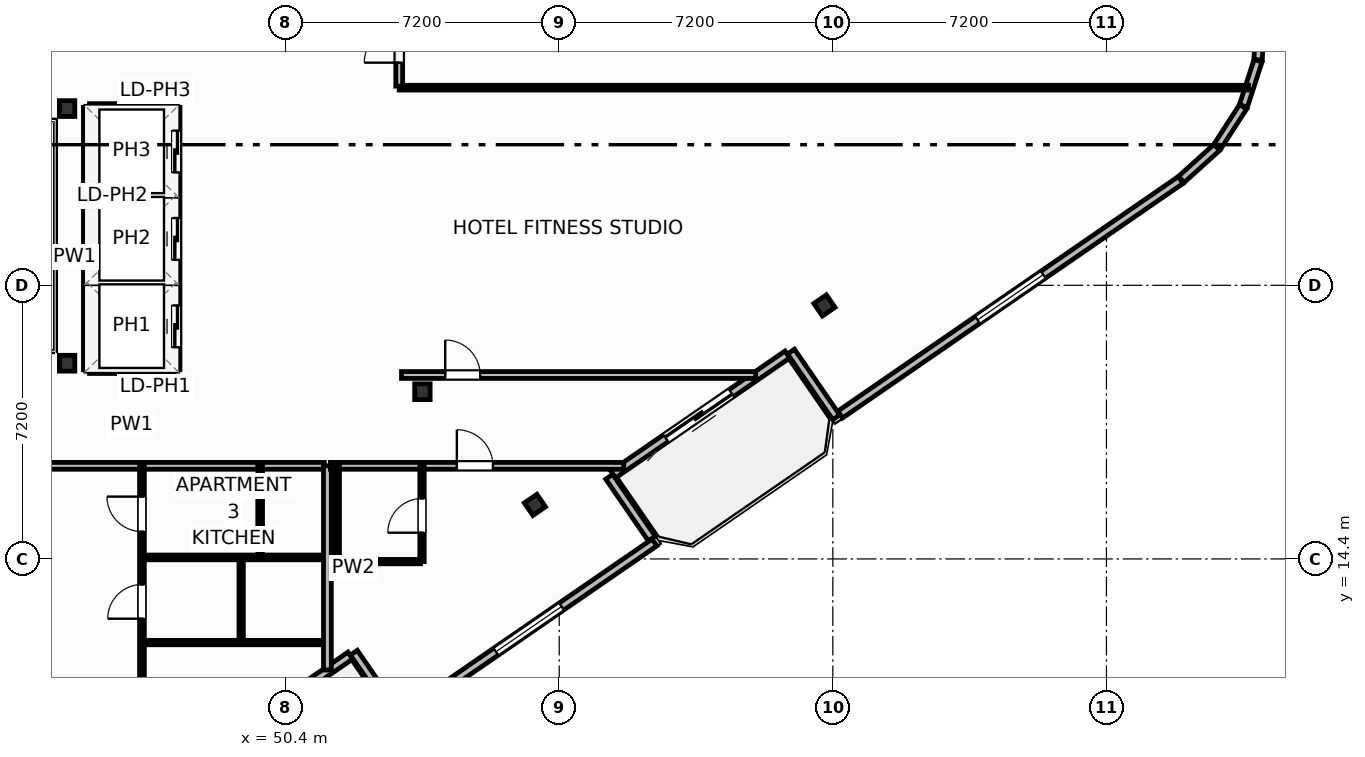
"""IFC4 building model, lengths in metres.
Left out: names, types, materials, properties, quantities, classifications, styles, units other than length and angle.
Written with IfcOpenShell. Run it as: python <this file> out.ifc"""

import sys

from ifc_helpers import new_model, si_unit, direction, frame, frame_2d, origin, origin_2d, place, context, subcontext, project, spatial, rectangle, i_section, extrude, element, fill, save


model = new_model("IFC4")
c1 = context("Model", 3, precision=1e-05, world=origin(), true_north=direction((0.0, 1.0)))
c2 = subcontext(c1, "Body", "Model", "MODEL_VIEW")
j1 = project(units=[si_unit("LENGTHUNIT", "METRE"), si_unit("PLANEANGLEUNIT", "RADIAN")], contexts=[c1])
p1 = place(None, origin())
s1 = spatial("IfcSite", under=j1, at=p1, CompositionType="ELEMENT")
p2 = place(p1, origin())
s2 = spatial("IfcBuilding", under=s1, at=p2, CompositionType="ELEMENT")
p3 = place(p2, frame((0.0, 0.0, 276.7)))
s3 = spatial("IfcBuildingStorey", under=s2, at=p3, CompositionType="ELEMENT", Elevation=276.7)
for number, where, z_axis, x_axis in (
    (1, (44.65, 19.55, 0.0), (0.0, 0.0, 1.0), (1.0, 0.0, 0.0)),
    (2, (44.65, 26.25, 0.0), (0.0, 0.0, 1.0), (1.0, 0.0, 0.0)),
    (3, (54.0, 18.8, 0.0), (0.0, 0.0, 1.0), (1.0, 0.0, 0.0)),
):
    element("IfcColumn", number, at=place(p3, frame(where, z_axis=z_axis, x_axis=x_axis)), inside=s3, PredefinedType="COLUMN", context=c2, shape_type="SweptSolid", body=[
        extrude(i_section(OverallWidth=0.406, OverallDepth=0.416, WebThickness=0.03, FlangeThickness=0.048, FilletRadius=0.025, at=origin_2d()), origin(), (0.0, 0.0, 1.0), 3.7),
    ])
for number, where, z_axis, x_axis in (
    (4, (56.96, 15.823, 0.0), (0.0, 0.0, 1.0), (0.824, 0.567, 0.0)),
    (5, (64.578, 21.07, 0.0), (0.0, 0.0, 1.0), (0.824, 0.567, 0.0)),
):
    element("IfcColumn", number, at=place(p3, frame(where, z_axis=z_axis, x_axis=x_axis)), inside=s3, PredefinedType="COLUMN", context=c2, shape_type="SweptSolid", body=[
        extrude(i_section(OverallWidth=0.401, OverallDepth=0.399, WebThickness=0.025, FlangeThickness=0.04, FilletRadius=0.022, at=origin_2d()), origin(), (0.0, 0.0, 1.0), 3.7),
    ])
p4 = place(p3, frame((52.103, 11.857, 0.0), z_axis=(0.0, 0.0, 1.0), x_axis=(-0.823534636215, -0.567265989598, 0.0)))
e6 = element("IfcWall", 6, at=p4, inside=s3, PredefinedType="SOLIDWALL", context=c2, shape_type="SweptSolid", body=[
    extrude(rectangle(XDim=6.0, YDim=0.22, at=frame_2d((3.0, 0.0))), origin(), (0.0, 0.0, 1.0), 2.73),
])
p5 = place(p4, frame((3.5, 0.0, 0.0)))
e7 = element("IfcOpeningElement", 7, at=p5, cuts=e6, PredefinedType="OPENING", context=c2, shape_type="SweptSolid", body=[
    extrude(rectangle(XDim=2.1, YDim=2.3, at=frame_2d((1.05, 1.15))), frame((0.0, 0.12, 0.0), z_axis=(0.0, -1.0, 0.0), x_axis=(1.0, 0.0, 0.0)), (0.0, 0.0, 1.0), 0.24),
])
p6 = place(p3, frame((63.605, 19.78, 0.0), z_axis=(0.0, 0.0, 1.0), x_axis=(-0.823541290762, -0.567256328665, 0.0)))
e8 = element("IfcWall", 8, at=p6, inside=s3, PredefinedType="SOLIDWALL", context=c2, shape_type="SweptSolid", body=[
    extrude(rectangle(XDim=5.567, YDim=0.22, at=frame_2d((2.784, 0.0))), origin(), (0.0, 0.0, 1.0), 2.73),
])
p7 = place(p6, frame((1.787, 0.0, 0.0)))
e9 = element("IfcOpeningElement", 9, at=p7, cuts=e8, PredefinedType="OPENING", context=c2, shape_type="SweptSolid", body=[
    extrude(rectangle(XDim=2.1, YDim=2.3, at=frame_2d((1.05, 1.15))), frame((0.0, 0.12, 0.0), z_axis=(0.0, -1.0, 0.0), x_axis=(1.0, 0.0, 0.0)), (0.0, 0.0, 1.0), 0.24),
])
p8 = place(p3, frame((52.196, 11.933, 0.0), z_axis=(0.0, 0.0, 1.0), x_axis=(0.56729822855, -0.823512428494, 0.0)))
e10 = element("IfcWall", 10, at=p8, inside=s3, PredefinedType="SOLIDWALL", context=c2, shape_type="SweptSolid", body=[
    extrude(rectangle(XDim=2.1, YDim=0.22, at=frame_2d((1.05, 0.0))), origin(), (0.0, 0.0, 1.0), 2.73),
])
p9 = place(p3, frame((53.49, 10.275, 0.0), z_axis=(0.0, 0.0, 1.0), x_axis=(0.823530942962, 0.56727135128, 0.0)))
e11 = element("IfcWall", 11, at=p9, inside=s3, PredefinedType="SOLIDWALL", context=c2, shape_type="SweptSolid", body=[
    extrude(rectangle(XDim=8.035, YDim=0.22, at=frame_2d((4.018, 0.0))), origin(), (0.0, 0.0, 1.0), 2.73),
])
p10 = place(p9, frame((2.968, 0.0, 0.8)))
e12 = element("IfcOpeningElement", 12, at=p10, cuts=e11, PredefinedType="OPENING", context=c2, shape_type="SweptSolid", body=[
    extrude(rectangle(XDim=2.1, YDim=1.75, at=frame_2d((1.05, 0.875))), frame((0.0, 0.12, 0.0), z_axis=(0.0, -1.0, 0.0), x_axis=(1.0, 0.0, 0.0)), (0.0, 0.0, 1.0), 0.24),
])
p11 = place(p3, frame((60.036, 14.936, 0.0), z_axis=(0.0, 0.0, 1.0), x_axis=(-0.567273565974, 0.823529417415, 0.0)))
e13 = element("IfcWall", 13, at=p11, inside=s3, PredefinedType="SOLIDWALL", context=c2, shape_type="SweptSolid", body=[
    extrude(rectangle(XDim=1.975, YDim=0.22, at=frame_2d((0.988, 0.0))), origin(), (0.0, 0.0, 1.0), 2.73),
])
p12 = place(p3, frame((63.698, 19.856, 0.0), z_axis=(0.0, 0.0, 1.0), x_axis=(0.567219383419, -0.823566737474, 0.0)))
e14 = element("IfcWall", 14, at=p12, inside=s3, PredefinedType="SOLIDWALL", context=c2, shape_type="SweptSolid", body=[
    extrude(rectangle(XDim=2.1, YDim=0.22, at=frame_2d((1.05, 0.0))), origin(), (0.0, 0.0, 1.0), 2.73),
])
p13 = place(p3, frame((64.992, 18.198, 0.0), z_axis=(0.0, 0.0, 1.0), x_axis=(0.823538117322, 0.56726093583, 0.0)))
e15 = element("IfcWall", 15, at=p13, inside=s3, PredefinedType="SOLIDWALL", context=c2, shape_type="SweptSolid", body=[
    extrude(rectangle(XDim=10.88, YDim=0.22, at=frame_2d((5.44, 0.0))), origin(), (0.0, 0.0, 1.0), 2.73),
])
p14 = place(p13, frame((4.39, 0.0, 0.8)))
e16 = element("IfcOpeningElement", 16, at=p14, cuts=e15, PredefinedType="OPENING", context=c2, shape_type="SweptSolid", body=[
    extrude(rectangle(XDim=2.1, YDim=1.75, at=frame_2d((1.05, 0.875))), frame((0.0, 0.12, 0.0), z_axis=(0.0, -1.0, 0.0), x_axis=(1.0, 0.0, 0.0)), (0.0, 0.0, 1.0), 0.24),
])
p15 = place(p3, frame((73.971, 24.387, 0.0), z_axis=(0.0, 0.0, 1.0), x_axis=(0.742501517089, 0.669844382764, 0.0)))
e17 = element("IfcWall", 17, at=p15, inside=s3, PredefinedType="SOLIDWALL", context=c2, shape_type="SweptSolid", body=[
    extrude(rectangle(XDim=1.257, YDim=0.22, at=frame_2d((0.628, 0.0))), origin(), (0.0, 0.0, 1.0), 2.73),
])
p16 = place(p3, frame((74.917, 25.25, 0.0), z_axis=(0.0, 0.0, 1.0), x_axis=(0.543778157277, 0.839229000731, 0.0)))
e18 = element("IfcWall", 18, at=p16, inside=s3, PredefinedType="SOLIDWALL", context=c2, shape_type="SweptSolid", body=[
    extrude(rectangle(XDim=1.249, YDim=0.22, at=frame_2d((0.624, 0.0))), origin(), (0.0, 0.0, 1.0), 2.73),
])
for number, where, z_axis, x_axis in (
    (19, (75.604, 26.321, 0.0), (0.0, 0.0, 1.0), (0.308, 0.951, 0.0)),
    (20, (75.99, 27.534, 0.0), (0.0, 0.0, 1.0), (0.051, 0.999, 0.0)),
):
    element("IfcWall", number, at=place(p3, frame(where, z_axis=z_axis, x_axis=x_axis)), inside=s3, PredefinedType="SOLIDWALL", context=c2, shape_type="SweptSolid", body=[
        extrude(rectangle(XDim=1.249, YDim=0.22, at=frame_2d((0.625, 0.0))), origin(), (0.0, 0.0, 1.0), 2.73),
    ])
p17 = place(p3, frame((39.28, 16.85, 0.0), z_axis=(0.0, 0.0, 1.0), x_axis=(1.0, 0.0, 0.0)))
e21 = element("IfcWall", 21, at=p17, inside=s3, PredefinedType="PARTITIONING", context=c2, shape_type="SweptSolid", body=[
    extrude(rectangle(XDim=12.14, YDim=0.18, at=frame_2d((6.07, 0.0))), origin(), (0.0, 0.0, 1.0), 3.45),
])
p18 = place(p17, frame((3.135, 0.0, 0.0)))
e22 = element("IfcOpeningElement", 22, at=p18, cuts=e21, PredefinedType="OPENING", context=c2, shape_type="SweptSolid", body=[
    extrude(rectangle(XDim=1.0, YDim=2.2, at=frame_2d((0.5, 1.1))), frame((0.0, 0.1, 0.0), z_axis=(0.0, -1.0, 0.0), x_axis=(1.0, 0.0, 0.0)), (0.0, 0.0, 1.0), 0.2),
])
p19 = place(p3, frame((46.62, 5.567, 0.0), z_axis=(0.0, 0.0, 1.0), x_axis=(0.0, 1.0, 0.0)))
e23 = element("IfcWall", 23, at=p19, inside=s3, PredefinedType="PARTITIONING", context=c2, shape_type="SweptSolid", body=[
    extrude(rectangle(XDim=11.283, YDim=0.125, at=frame_2d((5.642, 0.0))), origin(), (0.0, 0.0, 1.0), 3.45),
])
p20 = place(p19, frame((4.757, 0.0, 0.0)))
e24 = element("IfcOpeningElement", 24, at=p20, cuts=e23, PredefinedType="OPENING", context=c2, shape_type="SweptSolid", body=[
    extrude(rectangle(XDim=0.92, YDim=2.05, at=frame_2d((0.46, 1.025))), frame((0.0, 0.073, 0.0), z_axis=(0.0, -1.0, 0.0), x_axis=(1.0, 0.0, 0.0)), (0.0, 0.0, 1.0), 0.145),
])
p21 = place(p19, frame((7.26, 0.0, 0.0)))
e25 = element("IfcOpeningElement", 25, at=p21, cuts=e23, PredefinedType="OPENING", context=c2, shape_type="SweptSolid", body=[
    extrude(rectangle(XDim=0.9, YDim=2.05, at=frame_2d((0.45, 1.025))), frame((0.0, 0.073, 0.0), z_axis=(0.0, -1.0, 0.0), x_axis=(1.0, 0.0, 0.0)), (0.0, 0.0, 1.0), 0.145),
])
p22 = place(p19, frame((9.553, 0.0, 0.0)))
e26 = element("IfcOpeningElement", 26, at=p22, cuts=e23, PredefinedType="OPENING", context=c2, shape_type="SweptSolid", body=[
    extrude(rectangle(XDim=0.92, YDim=2.05, at=frame_2d((0.46, 1.025))), frame((0.0, 0.073, 0.0), z_axis=(0.0, -1.0, 0.0), x_axis=(1.0, 0.0, 0.0)), (0.0, 0.0, 1.0), 0.145),
])
p23 = place(p3, frame((46.69, 14.44, 0.0), z_axis=(0.0, 0.0, 1.0), x_axis=(1.0, 0.0, 0.0)))
e27 = element("IfcWall", 27, at=p23, inside=s3, PredefinedType="PARTITIONING", context=c2, shape_type="SweptSolid", body=[
    extrude(rectangle(XDim=4.73, YDim=0.125, at=frame_2d((2.365, 0.0))), origin(), (0.0, 0.0, 1.0), 3.45),
])
p24 = place(p3, frame((46.69, 12.2, 0.0), z_axis=(0.0, 0.0, 1.0), x_axis=(1.0, 0.0, 0.0)))
e28 = element("IfcWall", 28, at=p24, inside=s3, PredefinedType="PARTITIONING", context=c2, shape_type="SweptSolid", body=[
    extrude(rectangle(XDim=4.73, YDim=0.115, at=frame_2d((2.365, 0.0))), origin(), (0.0, 0.0, 1.0), 3.45),
])
p25 = place(p3, frame((49.73, 14.44, 0.0), z_axis=(0.0, 0.0, 1.0), x_axis=(0.0, 1.0, 0.0)))
e29 = element("IfcWall", 29, at=p25, inside=s3, PredefinedType="PARTITIONING", context=c2, shape_type="SweptSolid", body=[
    extrude(rectangle(XDim=2.41, YDim=0.125, at=frame_2d((1.205, 0.0))), origin(), (0.0, 0.0, 1.0), 3.45),
])
p26 = place(p3, frame((49.23, 12.2, 0.0), z_axis=(0.0, 0.0, 1.0), x_axis=(0.0, 1.0, 0.0)))
e30 = element("IfcWall", 30, at=p26, inside=s3, PredefinedType="PARTITIONING", context=c2, shape_type="SweptSolid", body=[
    extrude(rectangle(XDim=2.24, YDim=0.115, at=frame_2d((1.12, 0.0))), origin(), (0.0, 0.0, 1.0), 3.45),
])
p27 = place(p3, frame((51.5, 11.479, 0.0), z_axis=(0.0, 0.0, 1.0), x_axis=(0.0, 1.0, 0.0)))
e31 = element("IfcWall", 31, at=p27, inside=s3, PredefinedType="PARTITIONING", context=c2, shape_type="SweptSolid", body=[
    extrude(rectangle(XDim=5.372, YDim=0.205, at=frame_2d((2.686, 0.0))), origin(), (0.0, 0.0, 1.0), 3.45),
])
p28 = place(p3, frame((51.58, 16.85, 0.0), z_axis=(0.0, 0.0, 1.0), x_axis=(1.0, 0.0, 0.0)))
e32 = element("IfcWall", 32, at=p28, inside=s3, PredefinedType="PARTITIONING", context=c2, shape_type="SweptSolid", body=[
    extrude(rectangle(XDim=7.718, YDim=0.18, at=frame_2d((3.859, 0.0))), origin(), (0.0, 0.0, 1.0), 3.45),
])
p29 = place(p28, frame((3.326, 0.0, 0.0)))
e33 = element("IfcOpeningElement", 33, at=p29, cuts=e32, PredefinedType="OPENING", context=c2, shape_type="SweptSolid", body=[
    extrude(rectangle(XDim=0.95, YDim=2.15, at=frame_2d((0.475, 1.075))), frame((0.0, 0.1, 0.0), z_axis=(0.0, -1.0, 0.0), x_axis=(1.0, 0.0, 0.0)), (0.0, 0.0, 1.0), 0.2),
])
p30 = place(p3, frame((51.8, 14.33, 0.0), z_axis=(0.0, 0.0, 1.0), x_axis=(1.0, 0.0, 0.0)))
e34 = element("IfcWall", 34, at=p30, inside=s3, PredefinedType="PARTITIONING", context=c2, shape_type="SweptSolid", body=[
    extrude(rectangle(XDim=2.15, YDim=0.115, at=frame_2d((1.075, 0.0))), origin(), (0.0, 0.0, 1.0), 3.45),
])
p31 = place(p3, frame((53.99, 14.33, 0.0), z_axis=(0.0, 0.0, 1.0), x_axis=(0.0, 1.0, 0.0)))
e35 = element("IfcWall", 35, at=p31, inside=s3, PredefinedType="PARTITIONING", context=c2, shape_type="SweptSolid", body=[
    extrude(rectangle(XDim=2.52, YDim=0.115, at=frame_2d((1.26, 0.0))), origin(), (0.0, 0.0, 1.0), 3.45),
])
p32 = place(p31, frame((0.76, 0.0, 0.0)))
e36 = element("IfcOpeningElement", 36, at=p32, cuts=e35, PredefinedType="OPENING", context=c2, shape_type="SweptSolid", body=[
    extrude(rectangle(XDim=0.9, YDim=2.05, at=frame_2d((0.45, 1.025))), frame((0.0, 0.067, 0.0), z_axis=(0.0, -1.0, 0.0), x_axis=(1.0, 0.0, 0.0)), (0.0, 0.0, 1.0), 0.135),
])
p33 = place(p3, frame((51.76, 14.33, 0.0), z_axis=(0.0, 0.0, 1.0), x_axis=(0.0, 1.0, 0.0)))
e37 = element("IfcWall", 37, at=p33, inside=s3, PredefinedType="PARTITIONING", context=c2, shape_type="SweptSolid", body=[
    extrude(rectangle(XDim=2.52, YDim=0.115, at=frame_2d((1.26, 0.0))), origin(), (0.0, 0.0, 1.0), 3.45),
])
p34 = place(p3, frame((53.45, 19.24, 0.0), z_axis=(0.0, 0.0, 1.0), x_axis=(1.0, 0.0, 0.0)))
e38 = element("IfcWall", 38, at=p34, inside=s3, PredefinedType="PARTITIONING", context=c2, shape_type="SweptSolid", body=[
    extrude(rectangle(XDim=9.318, YDim=0.18, at=frame_2d((4.659, 0.0))), origin(), (0.0, 0.0, 1.0), 2.739),
])
p35 = place(p34, frame((1.15, 0.0, 0.0)))
e39 = element("IfcOpeningElement", 39, at=p35, cuts=e38, PredefinedType="OPENING", context=c2, shape_type="SweptSolid", body=[
    extrude(rectangle(XDim=0.92, YDim=2.05, at=frame_2d((0.46, 1.025))), frame((0.0, 0.1, 0.0), z_axis=(0.0, -1.0, 0.0), x_axis=(1.0, 0.0, 0.0)), (0.0, 0.0, 1.0), 0.2),
])
p36 = place(p3, frame((53.39, 26.8, 0.0), z_axis=(0.0, 0.0, 1.0), x_axis=(1.0, 0.0, 0.0)))
e40 = element("IfcWall", 40, at=p36, inside=s3, PredefinedType="PARTITIONING", context=c2, shape_type="SweptSolid", body=[
    extrude(rectangle(XDim=22.348, YDim=0.125, at=frame_2d((11.174, 0.0))), origin(), (0.0, 0.0, 1.0), 3.45),
])
p37 = place(p3, frame((53.39, 26.84, 0.0), z_axis=(0.0, 0.0, 1.0), x_axis=(0.0, 1.0, 0.0)))
e41 = element("IfcWall", 41, at=p37, inside=s3, PredefinedType="PARTITIONING", context=c2, shape_type="SweptSolid", body=[
    extrude(rectangle(XDim=12.46, YDim=0.18, at=frame_2d((6.23, 0.0))), origin(), (0.0, 0.0, 1.0), 3.45),
])
p38 = place(p37, frame((0.618, 0.0, 0.0)))
e42 = element("IfcOpeningElement", 42, at=p38, cuts=e41, PredefinedType="OPENING", context=c2, shape_type="SweptSolid", body=[
    extrude(rectangle(XDim=0.92, YDim=2.05, at=frame_2d((0.46, 1.025))), frame((0.0, 0.1, 0.0), z_axis=(0.0, -1.0, 0.0), x_axis=(1.0, 0.0, 0.0)), (0.0, 0.0, 1.0), 0.2),
])
for number, where, z_axis, x_axis in (
    (43, (45.24, 21.675, 0.0), (0.0, 0.0, 1.0), (1.0, 0.0, 0.0)),
    (44, (45.24, 23.975, 0.0), (0.0, 0.0, 1.0), (1.0, 0.0, 0.0)),
):
    element("IfcWall", number, at=place(p3, frame(where, z_axis=z_axis, x_axis=x_axis)), inside=s3, PredefinedType="PARTITIONING", context=c2, shape_type="SweptSolid", body=[
        extrude(rectangle(XDim=2.22, YDim=0.2, at=frame_2d((1.11, 0.0))), origin(), (0.0, 0.0, 1.0), 3.45),
    ])
p39 = place(p3, frame((45.24, 19.38, 0.0), z_axis=(0.0, 0.0, 1.0), x_axis=(1.0, 0.0, 0.0)))
e45 = element("IfcWall", 45, at=p39, inside=s3, PredefinedType="PARTITIONING", context=c2, shape_type="SweptSolid", body=[
    extrude(rectangle(XDim=2.22, YDim=0.2, at=frame_2d((1.11, 0.0))), origin(), (0.0, 0.0, 1.0), 2.662),
])
p40 = place(p3, frame((45.24, 26.28, 0.0), z_axis=(0.0, 0.0, 1.0), x_axis=(1.0, 0.0, 0.0)))
e46 = element("IfcWall", 46, at=p40, inside=s3, PredefinedType="PARTITIONING", context=c2, shape_type="SweptSolid", body=[
    extrude(rectangle(XDim=2.22, YDim=0.2, at=frame_2d((1.11, 0.0))), origin(), (0.0, 0.0, 1.0), 3.45),
])
p41 = place(p3, frame((45.18, 19.38, 0.0), z_axis=(0.0, 0.0, 1.0), x_axis=(0.0, 1.0, 0.0)))
e47 = element("IfcWall", 47, at=p41, inside=s3, PredefinedType="PARTITIONING", context=c2, shape_type="SweptSolid", body=[
    extrude(rectangle(XDim=6.9, YDim=0.2, at=frame_2d((3.45, 0.0))), origin(), (0.0, 0.0, 1.0), 3.45),
])
p42 = place(p3, frame((47.52, 19.38, 0.0), z_axis=(0.0, 0.0, 1.0), x_axis=(0.0, 1.0, 0.0)))
e48 = element("IfcWall", 48, at=p42, inside=s3, PredefinedType="PARTITIONING", context=c2, shape_type="SweptSolid", body=[
    extrude(rectangle(XDim=6.9, YDim=0.2, at=frame_2d((3.45, 0.0))), origin(), (0.0, 0.0, 1.0), 3.45),
])
p43 = place(p42, frame((0.59, 0.0, 0.0)))
e49 = element("IfcOpeningElement", 49, at=p43, cuts=e48, PredefinedType="OPENING", context=c2, shape_type="SweptSolid", body=[
    extrude(rectangle(XDim=1.1, YDim=2.15, at=frame_2d((0.55, 1.075))), frame((0.0, 0.11, 0.0), z_axis=(0.0, -1.0, 0.0), x_axis=(1.0, 0.0, 0.0)), (0.0, 0.0, 1.0), 0.22),
])
p44 = place(p42, frame((2.89, 0.0, 0.0)))
e50 = element("IfcOpeningElement", 50, at=p44, cuts=e48, PredefinedType="OPENING", context=c2, shape_type="SweptSolid", body=[
    extrude(rectangle(XDim=1.1, YDim=2.15, at=frame_2d((0.55, 1.075))), frame((0.0, 0.11, 0.0), z_axis=(0.0, -1.0, 0.0), x_axis=(1.0, 0.0, 0.0)), (0.0, 0.0, 1.0), 0.22),
])
p45 = place(p42, frame((5.19, 0.0, 0.0)))
e51 = element("IfcOpeningElement", 51, at=p45, cuts=e48, PredefinedType="OPENING", context=c2, shape_type="SweptSolid", body=[
    extrude(rectangle(XDim=1.1, YDim=2.15, at=frame_2d((0.55, 1.075))), frame((0.0, 0.11, 0.0), z_axis=(0.0, -1.0, 0.0), x_axis=(1.0, 0.0, 0.0)), (0.0, 0.0, 1.0), 0.22),
])
p46 = place(p7, origin())
e52 = element("IfcDoor", 52, at=p46, inside=s3, OperationType="SLIDING_TO_LEFT", PredefinedType="DOOR", context=c2, shape_type="SweptSolid", body=[
    extrude(rectangle(XDim=2.1, YDim=2.3, at=frame_2d((1.05, 1.15))), frame((0.0, 0.025, 0.0), z_axis=(0.0, -1.0, 0.0), x_axis=(1.0, 0.0, 0.0)), (0.0, 0.0, 1.0), 0.05),
])
fill(e9, e52)
p47 = place(p10, origin())
e53 = element("IfcWindow", 53, at=p47, inside=s3, PartitioningType="SINGLE_PANEL", PredefinedType="WINDOW", context=c2, shape_type="SweptSolid", body=[
    extrude(rectangle(XDim=2.1, YDim=1.75, at=frame_2d((1.05, 0.875))), frame((0.0, 0.03, 0.0), z_axis=(0.0, -1.0, 0.0), x_axis=(1.0, 0.0, 0.0)), (0.0, 0.0, 1.0), 0.06),
])
fill(e12, e53)
p48 = place(p14, origin())
e54 = element("IfcWindow", 54, at=p48, inside=s3, PartitioningType="SINGLE_PANEL", PredefinedType="WINDOW", context=c2, shape_type="SweptSolid", body=[
    extrude(rectangle(XDim=2.1, YDim=1.75, at=frame_2d((1.05, 0.875))), frame((0.0, 0.03, 0.0), z_axis=(0.0, -1.0, 0.0), x_axis=(1.0, 0.0, 0.0)), (0.0, 0.0, 1.0), 0.06),
])
fill(e16, e54)
p49 = place(p21, origin())
e55 = element("IfcDoor", 55, at=p49, inside=s3, OperationType="SINGLE_SWING_LEFT", PredefinedType="DOOR", context=c2, shape_type="SweptSolid", body=[
    extrude(rectangle(XDim=0.9, YDim=2.05, at=frame_2d((0.45, 1.025))), frame((0.0, 0.025, 0.0), z_axis=(0.0, -1.0, 0.0), x_axis=(1.0, 0.0, 0.0)), (0.0, 0.0, 1.0), 0.05),
])
fill(e25, e55)
p50 = place(p22, origin())
e56 = element("IfcDoor", 56, at=p50, inside=s3, OperationType="SINGLE_SWING_RIGHT", PredefinedType="DOOR", context=c2, shape_type="SweptSolid", body=[
    extrude(rectangle(XDim=0.92, YDim=2.05, at=frame_2d((0.46, 1.025))), frame((0.0, 0.025, 0.0), z_axis=(0.0, -1.0, 0.0), x_axis=(1.0, 0.0, 0.0)), (0.0, 0.0, 1.0), 0.05),
])
fill(e26, e56)
p51 = place(p29, origin())
e57 = element("IfcDoor", 57, at=p51, inside=s3, OperationType="SINGLE_SWING_LEFT", PredefinedType="DOOR", context=c2, shape_type="SweptSolid", body=[
    extrude(rectangle(XDim=0.95, YDim=2.15, at=frame_2d((0.475, 1.075))), frame((0.0, 0.025, 0.0), z_axis=(0.0, -1.0, 0.0), x_axis=(1.0, 0.0, 0.0)), (0.0, 0.0, 1.0), 0.05),
])
fill(e33, e57)
p52 = place(p32, origin())
e58 = element("IfcDoor", 58, at=p52, inside=s3, OperationType="SINGLE_SWING_LEFT", PredefinedType="DOOR", context=c2, shape_type="SweptSolid", body=[
    extrude(rectangle(XDim=0.9, YDim=2.05, at=frame_2d((0.45, 1.025))), frame((0.0, 0.025, 0.0), z_axis=(0.0, -1.0, 0.0), x_axis=(1.0, 0.0, 0.0)), (0.0, 0.0, 1.0), 0.05),
])
fill(e36, e58)
p53 = place(p35, origin())
e59 = element("IfcDoor", 59, at=p53, inside=s3, OperationType="SINGLE_SWING_LEFT", PredefinedType="DOOR", context=c2, shape_type="SweptSolid", body=[
    extrude(rectangle(XDim=0.92, YDim=2.05, at=frame_2d((0.46, 1.025))), frame((0.0, 0.025, 0.0), z_axis=(0.0, -1.0, 0.0), x_axis=(1.0, 0.0, 0.0)), (0.0, 0.0, 1.0), 0.05),
])
fill(e39, e59)
p54 = place(p38, origin())
e60 = element("IfcDoor", 60, at=p54, inside=s3, OperationType="SINGLE_SWING_LEFT", PredefinedType="DOOR", context=c2, shape_type="SweptSolid", body=[
    extrude(rectangle(XDim=0.92, YDim=2.05, at=frame_2d((0.46, 1.025))), frame((0.0, 0.025, 0.0), z_axis=(0.0, -1.0, 0.0), x_axis=(1.0, 0.0, 0.0)), (0.0, 0.0, 1.0), 0.05),
])
fill(e42, e60)
p55 = place(p43, origin())
e61 = element("IfcDoor", 61, at=p55, inside=s3, OperationType="SLIDING_TO_LEFT", PredefinedType="DOOR", context=c2, shape_type="SweptSolid", body=[
    extrude(rectangle(XDim=1.1, YDim=2.15, at=frame_2d((0.55, 1.075))), frame((0.0, 0.025, 0.0), z_axis=(0.0, -1.0, 0.0), x_axis=(1.0, 0.0, 0.0)), (0.0, 0.0, 1.0), 0.05),
])
fill(e49, e61)
p56 = place(p44, origin())
e62 = element("IfcDoor", 62, at=p56, inside=s3, OperationType="SLIDING_TO_LEFT", PredefinedType="DOOR", context=c2, shape_type="SweptSolid", body=[
    extrude(rectangle(XDim=1.1, YDim=2.15, at=frame_2d((0.55, 1.075))), frame((0.0, 0.025, 0.0), z_axis=(0.0, -1.0, 0.0), x_axis=(1.0, 0.0, 0.0)), (0.0, 0.0, 1.0), 0.05),
])
fill(e50, e62)
p57 = place(p45, origin())
e63 = element("IfcDoor", 63, at=p57, inside=s3, OperationType="SLIDING_TO_LEFT", PredefinedType="DOOR", context=c2, shape_type="SweptSolid", body=[
    extrude(rectangle(XDim=1.1, YDim=2.15, at=frame_2d((0.55, 1.075))), frame((0.0, 0.025, 0.0), z_axis=(0.0, -1.0, 0.0), x_axis=(1.0, 0.0, 0.0)), (0.0, 0.0, 1.0), 0.05),
])
fill(e51, e63)
save(model, sys.argv[1])
